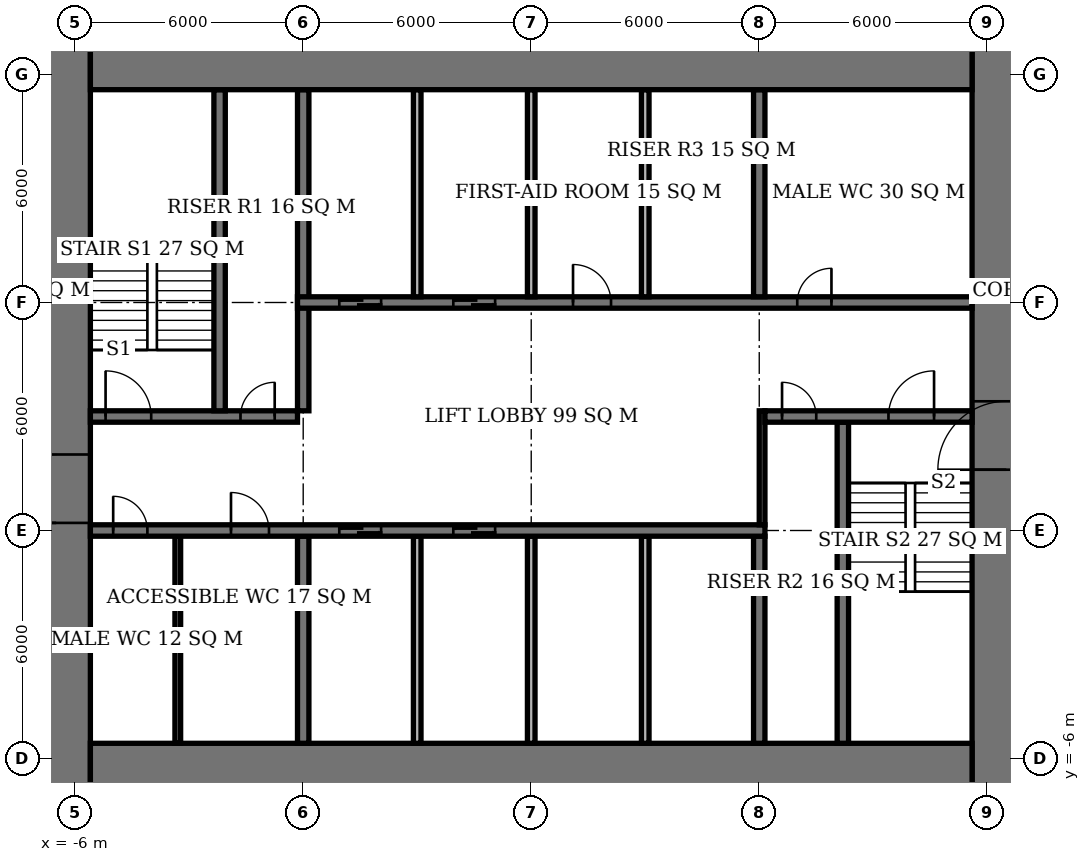
"""IFC4 building model, lengths in metres.
Left out: names, types, materials, properties, quantities, classifications, styles, units other than length and angle.
Written with IfcOpenShell. Run it as: python <this file> out.ifc"""

import sys

from ifc_helpers import new_model, si_unit, direction, frame, frame_2d, origin, place, context, subcontext, project, spatial, rectangle, extrude, element, fill, save


model = new_model("IFC4")
c1 = context("Model", 3, precision=1e-05, world=origin(), true_north=direction((0.0, 1.0)))
c2 = subcontext(c1, "Body", "Model", "MODEL_VIEW")
j1 = project(units=[si_unit("LENGTHUNIT", "METRE"), si_unit("PLANEANGLEUNIT", "RADIAN")], contexts=[c1])
p1 = place(None, origin())
s1 = spatial("IfcSite", under=j1, at=p1, CompositionType="ELEMENT")
p2 = place(p1, origin())
s2 = spatial("IfcBuilding", under=s1, at=p2, CompositionType="ELEMENT")
p3 = place(p2, frame((0.0, 0.0, 125.0)))
s3 = spatial("IfcBuildingStorey", under=s2, at=p3, CompositionType="ELEMENT", Elevation=125.0)
for number, where, z_axis, x_axis in (
    (1, (-5.6, -6.6, 0.0), (0.0, 0.0, 1.0), (1.0, 0.0, 0.0)),
    (2, (-5.6, 12.6, 0.0), (0.0, 0.0, 1.0), (1.0, 0.0, 0.0)),
):
    element("IfcWall", number, at=place(p3, frame(where, z_axis=z_axis, x_axis=x_axis)), inside=s3, PredefinedType="SHEAR", context=c2, shape_type="SweptSolid", body=[
        extrude(rectangle(XDim=23.2, YDim=2.0, at=frame_2d((11.6, 0.0))), origin(), (0.0, 0.0, 1.0), 3.9),
    ])
p4 = place(p3, frame((-6.5, -7.6, 0.0), z_axis=(0.0, 0.0, 1.0), x_axis=(0.0, 1.0, 0.0)))
e3 = element("IfcWall", 3, at=p4, inside=s3, PredefinedType="SHEAR", context=c2, shape_type="SweptSolid", body=[
    extrude(rectangle(XDim=21.2, YDim=1.8, at=frame_2d((10.6, 0.0))), origin(), (0.0, 0.0, 1.0), 3.9),
])
p5 = place(p4, frame((7.8, 0.0, 0.0)))
e4 = element("IfcOpeningElement", 4, at=p5, cuts=e3, PredefinedType="OPENING", context=c2, shape_type="SweptSolid", body=[
    extrude(rectangle(XDim=1.8, YDim=2.4, at=frame_2d((0.9, 1.2))), frame((0.0, 0.91, 0.0), z_axis=(0.0, -1.0, 0.0), x_axis=(1.0, 0.0, 0.0)), (0.0, 0.0, 1.0), 1.82),
])
p6 = place(p3, frame((18.5, -7.6, 0.0), z_axis=(0.0, 0.0, 1.0), x_axis=(0.0, 1.0, 0.0)))
e5 = element("IfcWall", 5, at=p6, inside=s3, PredefinedType="SHEAR", context=c2, shape_type="SweptSolid", body=[
    extrude(rectangle(XDim=21.2, YDim=1.8, at=frame_2d((10.6, 0.0))), origin(), (0.0, 0.0, 1.0), 3.9),
])
p7 = place(p6, frame((9.2, 0.0, 0.0)))
e6 = element("IfcOpeningElement", 6, at=p7, cuts=e5, PredefinedType="OPENING", context=c2, shape_type="SweptSolid", body=[
    extrude(rectangle(XDim=1.8, YDim=2.4, at=frame_2d((0.9, 1.2))), frame((0.0, 0.91, 0.0), z_axis=(0.0, -1.0, 0.0), x_axis=(1.0, 0.0, 0.0)), (0.0, 0.0, 1.0), 1.82),
])
p8 = place(p3, frame((-5.6, 0.0, 0.0), z_axis=(0.0, 0.0, 1.0), x_axis=(1.0, 0.0, 0.0)))
e7 = element("IfcWall", 7, at=p8, inside=s3, PredefinedType="SHEAR", context=c2, shape_type="SweptSolid", body=[
    extrude(rectangle(XDim=17.75, YDim=0.3, at=frame_2d((8.875, 0.0))), origin(), (0.0, 0.0, 1.0), 3.9),
])
p9 = place(p8, frame((0.6, 0.0, 0.0)))
e8 = element("IfcOpeningElement", 8, at=p9, cuts=e7, PredefinedType="OPENING", context=c2, shape_type="SweptSolid", body=[
    extrude(rectangle(XDim=0.9, YDim=2.1, at=frame_2d((0.45, 1.05))), frame((0.0, 0.16, 0.0), z_axis=(0.0, -1.0, 0.0), x_axis=(1.0, 0.0, 0.0)), (0.0, 0.0, 1.0), 0.32),
])
p10 = place(p8, frame((3.7, 0.0, 0.0)))
e9 = element("IfcOpeningElement", 9, at=p10, cuts=e7, PredefinedType="OPENING", context=c2, shape_type="SweptSolid", body=[
    extrude(rectangle(XDim=1.0, YDim=2.1, at=frame_2d((0.5, 1.05))), frame((0.0, 0.16, 0.0), z_axis=(0.0, -1.0, 0.0), x_axis=(1.0, 0.0, 0.0)), (0.0, 0.0, 1.0), 0.32),
])
p11 = place(p8, frame((6.55, 0.0, 0.0)))
e10 = element("IfcOpeningElement", 10, at=p11, cuts=e7, PredefinedType="OPENING", context=c2, shape_type="SweptSolid", body=[
    extrude(rectangle(XDim=1.1, YDim=2.1, at=frame_2d((0.55, 1.05))), frame((0.0, 0.16, 0.0), z_axis=(0.0, -1.0, 0.0), x_axis=(1.0, 0.0, 0.0)), (0.0, 0.0, 1.0), 0.32),
])
p12 = place(p8, frame((9.55, 0.0, 0.0)))
e11 = element("IfcOpeningElement", 11, at=p12, cuts=e7, PredefinedType="OPENING", context=c2, shape_type="SweptSolid", body=[
    extrude(rectangle(XDim=1.1, YDim=2.1, at=frame_2d((0.55, 1.05))), frame((0.0, 0.16, 0.0), z_axis=(0.0, -1.0, 0.0), x_axis=(1.0, 0.0, 0.0)), (0.0, 0.0, 1.0), 0.32),
])
p13 = place(p3, frame((-5.6, 3.0, 0.0), z_axis=(0.0, 0.0, 1.0), x_axis=(1.0, 0.0, 0.0)))
e12 = element("IfcWall", 12, at=p13, inside=s3, PredefinedType="SHEAR", context=c2, shape_type="SweptSolid", body=[
    extrude(rectangle(XDim=5.45, YDim=0.3, at=frame_2d((2.725, 0.0))), origin(), (0.0, 0.0, 1.0), 3.9),
])
p14 = place(p13, frame((0.4, 0.0, 0.0)))
e13 = element("IfcOpeningElement", 13, at=p14, cuts=e12, PredefinedType="OPENING", context=c2, shape_type="SweptSolid", body=[
    extrude(rectangle(XDim=1.2, YDim=2.1, at=frame_2d((0.6, 1.05))), frame((0.0, 0.16, 0.0), z_axis=(0.0, -1.0, 0.0), x_axis=(1.0, 0.0, 0.0)), (0.0, 0.0, 1.0), 0.32),
])
p15 = place(p13, frame((3.95, 0.0, 0.0)))
e14 = element("IfcOpeningElement", 14, at=p15, cuts=e12, PredefinedType="OPENING", context=c2, shape_type="SweptSolid", body=[
    extrude(rectangle(XDim=0.9, YDim=2.1, at=frame_2d((0.45, 1.05))), frame((0.0, 0.16, 0.0), z_axis=(0.0, -1.0, 0.0), x_axis=(1.0, 0.0, 0.0)), (0.0, 0.0, 1.0), 0.32),
])
p16 = place(p3, frame((12.15, 3.0, 0.0), z_axis=(0.0, 0.0, 1.0), x_axis=(1.0, 0.0, 0.0)))
e15 = element("IfcWall", 15, at=p16, inside=s3, PredefinedType="SHEAR", context=c2, shape_type="SweptSolid", body=[
    extrude(rectangle(XDim=5.45, YDim=0.3, at=frame_2d((2.725, 0.0))), origin(), (0.0, 0.0, 1.0), 3.9),
])
p17 = place(p16, frame((3.25, 0.0, 0.0)))
e16 = element("IfcOpeningElement", 16, at=p17, cuts=e15, PredefinedType="OPENING", context=c2, shape_type="SweptSolid", body=[
    extrude(rectangle(XDim=1.2, YDim=2.1, at=frame_2d((0.6, 1.05))), frame((0.0, 0.16, 0.0), z_axis=(0.0, -1.0, 0.0), x_axis=(1.0, 0.0, 0.0)), (0.0, 0.0, 1.0), 0.32),
])
p18 = place(p16, frame((0.45, 0.0, 0.0)))
e17 = element("IfcOpeningElement", 17, at=p18, cuts=e15, PredefinedType="OPENING", context=c2, shape_type="SweptSolid", body=[
    extrude(rectangle(XDim=0.9, YDim=2.1, at=frame_2d((0.45, 1.05))), frame((0.0, 0.16, 0.0), z_axis=(0.0, -1.0, 0.0), x_axis=(1.0, 0.0, 0.0)), (0.0, 0.0, 1.0), 0.32),
])
p19 = place(p3, frame((-0.15, 6.0, 0.0), z_axis=(0.0, 0.0, 1.0), x_axis=(1.0, 0.0, 0.0)))
e18 = element("IfcWall", 18, at=p19, inside=s3, PredefinedType="SHEAR", context=c2, shape_type="SweptSolid", body=[
    extrude(rectangle(XDim=17.75, YDim=0.3, at=frame_2d((8.875, 0.0))), origin(), (0.0, 0.0, 1.0), 3.9),
])
p20 = place(p19, frame((13.15, 0.0, 0.0)))
e19 = element("IfcOpeningElement", 19, at=p20, cuts=e18, PredefinedType="OPENING", context=c2, shape_type="SweptSolid", body=[
    extrude(rectangle(XDim=0.9, YDim=2.1, at=frame_2d((0.45, 1.05))), frame((0.0, 0.16, 0.0), z_axis=(0.0, -1.0, 0.0), x_axis=(1.0, 0.0, 0.0)), (0.0, 0.0, 1.0), 0.32),
])
p21 = place(p19, frame((7.25, 0.0, 0.0)))
e20 = element("IfcOpeningElement", 20, at=p21, cuts=e18, PredefinedType="OPENING", context=c2, shape_type="SweptSolid", body=[
    extrude(rectangle(XDim=1.0, YDim=2.1, at=frame_2d((0.5, 1.05))), frame((0.0, 0.16, 0.0), z_axis=(0.0, -1.0, 0.0), x_axis=(1.0, 0.0, 0.0)), (0.0, 0.0, 1.0), 0.32),
])
p22 = place(p19, frame((1.1, 0.0, 0.0)))
e21 = element("IfcOpeningElement", 21, at=p22, cuts=e18, PredefinedType="OPENING", context=c2, shape_type="SweptSolid", body=[
    extrude(rectangle(XDim=1.1, YDim=2.1, at=frame_2d((0.55, 1.05))), frame((0.0, 0.16, 0.0), z_axis=(0.0, -1.0, 0.0), x_axis=(1.0, 0.0, 0.0)), (0.0, 0.0, 1.0), 0.32),
])
p23 = place(p19, frame((4.1, 0.0, 0.0)))
e22 = element("IfcOpeningElement", 22, at=p23, cuts=e18, PredefinedType="OPENING", context=c2, shape_type="SweptSolid", body=[
    extrude(rectangle(XDim=1.1, YDim=2.1, at=frame_2d((0.55, 1.05))), frame((0.0, 0.16, 0.0), z_axis=(0.0, -1.0, 0.0), x_axis=(1.0, 0.0, 0.0)), (0.0, 0.0, 1.0), 0.32),
])
p24 = place(p3, frame((0.0, -5.6, 0.0), z_axis=(0.0, 0.0, 1.0), x_axis=(0.0, 1.0, 0.0)))
e23 = element("IfcWall", 23, at=p24, inside=s3, PredefinedType="SHEAR", context=c2, shape_type="SweptSolid", body=[
    extrude(rectangle(XDim=5.45, YDim=0.3, at=frame_2d((2.725, 0.0))), origin(), (0.0, 0.0, 1.0), 3.9),
])
p25 = place(p3, frame((0.0, 3.15, 0.0), z_axis=(0.0, 0.0, 1.0), x_axis=(0.0, 1.0, 0.0)))
e24 = element("IfcWall", 24, at=p25, inside=s3, PredefinedType="SHEAR", context=c2, shape_type="SweptSolid", body=[
    extrude(rectangle(XDim=8.45, YDim=0.3, at=frame_2d((4.225, 0.0))), origin(), (0.0, 0.0, 1.0), 3.9),
])
for number, where, z_axis, x_axis in (
    (25, (12.0, -5.6, 0.0), (0.0, 0.0, 1.0), (0.0, 1.0, 0.0)),
    (26, (12.0, 6.15, 0.0), (0.0, 0.0, 1.0), (0.0, 1.0, 0.0)),
):
    element("IfcWall", number, at=place(p3, frame(where, z_axis=z_axis, x_axis=x_axis)), inside=s3, PredefinedType="SHEAR", context=c2, shape_type="SweptSolid", body=[
        extrude(rectangle(XDim=5.45, YDim=0.3, at=frame_2d((2.725, 0.0))), origin(), (0.0, 0.0, 1.0), 3.9),
    ])
for number, where, z_axis, x_axis in (
    (27, (-2.2, 3.15, 0.0), (0.0, 0.0, 1.0), (0.0, 1.0, 0.0)),
    (28, (14.2, -5.6, 0.0), (0.0, 0.0, 1.0), (0.0, 1.0, 0.0)),
):
    element("IfcWall", number, at=place(p3, frame(where, z_axis=z_axis, x_axis=x_axis)), inside=s3, PredefinedType="SHEAR", context=c2, shape_type="SweptSolid", body=[
        extrude(rectangle(XDim=8.45, YDim=0.3, at=frame_2d((4.225, 0.0))), origin(), (0.0, 0.0, 1.0), 3.9),
    ])
for number, where, z_axis, x_axis in (
    (29, (3.0, 6.15, 0.0), (0.0, 0.0, 1.0), (0.0, 1.0, 0.0)),
    (30, (6.0, 6.15, 0.0), (0.0, 0.0, 1.0), (0.0, 1.0, 0.0)),
    (31, (9.0, 6.15, 0.0), (0.0, 0.0, 1.0), (0.0, 1.0, 0.0)),
    (32, (3.0, -5.6, 0.0), (0.0, 0.0, 1.0), (0.0, 1.0, 0.0)),
    (33, (6.0, -5.6, 0.0), (0.0, 0.0, 1.0), (0.0, 1.0, 0.0)),
    (34, (9.0, -5.6, 0.0), (0.0, 0.0, 1.0), (0.0, 1.0, 0.0)),
):
    element("IfcWall", number, at=place(p3, frame(where, z_axis=z_axis, x_axis=x_axis)), inside=s3, PredefinedType="SOLIDWALL", context=c2, shape_type="SweptSolid", body=[
        extrude(rectangle(XDim=5.45, YDim=0.2, at=frame_2d((2.725, 0.0))), origin(), (0.0, 0.0, 1.0), 3.9),
    ])
p26 = place(p3, frame((-3.3, -5.6, 0.0), z_axis=(0.0, 0.0, 1.0), x_axis=(0.0, 1.0, 0.0)))
e35 = element("IfcWall", 35, at=p26, inside=s3, PredefinedType="PLUMBINGWALL", context=c2, shape_type="SweptSolid", body=[
    extrude(rectangle(XDim=5.45, YDim=0.15, at=frame_2d((2.725, 0.0))), origin(), (0.0, 0.0, 1.0), 3.65),
])
p27 = place(p3, frame((12.075, 0.15, 0.0), z_axis=(0.0, 0.0, 1.0), x_axis=(0.0, 1.0, 0.0)))
e36 = element("IfcWall", 36, at=p27, inside=s3, PredefinedType="PARTITIONING", context=c2, shape_type="SweptSolid", body=[
    extrude(rectangle(XDim=3.0, YDim=0.15, at=frame_2d((1.5, 0.0))), origin(), (0.0, 0.0, 1.0), 3.65),
])
p28 = place(p5, origin())
e37 = element("IfcDoor", 37, at=p28, inside=s3, OperationType="DOUBLE_DOOR_SINGLE_SWING", PredefinedType="DOOR", context=c2, shape_type="SweptSolid", body=[
    extrude(rectangle(XDim=1.8, YDim=2.4, at=frame_2d((0.9, 1.2))), frame((0.0, 0.025, 0.0), z_axis=(0.0, -1.0, 0.0), x_axis=(1.0, 0.0, 0.0)), (0.0, 0.0, 1.0), 0.05),
])
fill(e4, e37)
p29 = place(p7, origin())
e38 = element("IfcDoor", 38, at=p29, inside=s3, OperationType="DOUBLE_DOOR_SINGLE_SWING", PredefinedType="DOOR", context=c2, shape_type="SweptSolid", body=[
    extrude(rectangle(XDim=1.8, YDim=2.4, at=frame_2d((0.9, 1.2))), frame((0.0, 0.025, 0.0), z_axis=(0.0, -1.0, 0.0), x_axis=(1.0, 0.0, 0.0)), (0.0, 0.0, 1.0), 0.05),
])
fill(e6, e38)
p30 = place(p14, origin())
e39 = element("IfcDoor", 39, at=p30, inside=s3, OperationType="SINGLE_SWING_LEFT", PredefinedType="DOOR", context=c2, shape_type="SweptSolid", body=[
    extrude(rectangle(XDim=1.2, YDim=2.1, at=frame_2d((0.6, 1.05))), frame((0.0, 0.025, 0.0), z_axis=(0.0, -1.0, 0.0), x_axis=(1.0, 0.0, 0.0)), (0.0, 0.0, 1.0), 0.05),
])
fill(e13, e39)
p31 = place(p15, origin())
e40 = element("IfcDoor", 40, at=p31, inside=s3, OperationType="SINGLE_SWING_RIGHT", PredefinedType="DOOR", context=c2, shape_type="SweptSolid", body=[
    extrude(rectangle(XDim=0.9, YDim=2.1, at=frame_2d((0.45, 1.05))), frame((0.0, 0.025, 0.0), z_axis=(0.0, -1.0, 0.0), x_axis=(1.0, 0.0, 0.0)), (0.0, 0.0, 1.0), 0.05),
])
fill(e14, e40)
p32 = place(p17, origin())
e41 = element("IfcDoor", 41, at=p32, inside=s3, OperationType="SINGLE_SWING_RIGHT", PredefinedType="DOOR", context=c2, shape_type="SweptSolid", body=[
    extrude(rectangle(XDim=1.2, YDim=2.1, at=frame_2d((0.6, 1.05))), frame((0.0, 0.025, 0.0), z_axis=(0.0, -1.0, 0.0), x_axis=(1.0, 0.0, 0.0)), (0.0, 0.0, 1.0), 0.05),
])
fill(e16, e41)
p33 = place(p18, origin())
e42 = element("IfcDoor", 42, at=p33, inside=s3, OperationType="SINGLE_SWING_LEFT", PredefinedType="DOOR", context=c2, shape_type="SweptSolid", body=[
    extrude(rectangle(XDim=0.9, YDim=2.1, at=frame_2d((0.45, 1.05))), frame((0.0, 0.025, 0.0), z_axis=(0.0, -1.0, 0.0), x_axis=(1.0, 0.0, 0.0)), (0.0, 0.0, 1.0), 0.05),
])
fill(e17, e42)
p34 = place(p9, origin())
e43 = element("IfcDoor", 43, at=p34, inside=s3, OperationType="SINGLE_SWING_LEFT", PredefinedType="DOOR", context=c2, shape_type="SweptSolid", body=[
    extrude(rectangle(XDim=0.9, YDim=2.1, at=frame_2d((0.45, 1.05))), frame((0.0, 0.025, 0.0), z_axis=(0.0, -1.0, 0.0), x_axis=(1.0, 0.0, 0.0)), (0.0, 0.0, 1.0), 0.05),
])
fill(e8, e43)
p35 = place(p10, origin())
e44 = element("IfcDoor", 44, at=p35, inside=s3, OperationType="SINGLE_SWING_LEFT", PredefinedType="DOOR", context=c2, shape_type="SweptSolid", body=[
    extrude(rectangle(XDim=1.0, YDim=2.1, at=frame_2d((0.5, 1.05))), frame((0.0, 0.025, 0.0), z_axis=(0.0, -1.0, 0.0), x_axis=(1.0, 0.0, 0.0)), (0.0, 0.0, 1.0), 0.05),
])
fill(e9, e44)
p36 = place(p20, origin())
e45 = element("IfcDoor", 45, at=p36, inside=s3, OperationType="SINGLE_SWING_RIGHT", PredefinedType="DOOR", context=c2, shape_type="SweptSolid", body=[
    extrude(rectangle(XDim=0.9, YDim=2.1, at=frame_2d((0.45, 1.05))), frame((0.0, 0.025, 0.0), z_axis=(0.0, -1.0, 0.0), x_axis=(1.0, 0.0, 0.0)), (0.0, 0.0, 1.0), 0.05),
])
fill(e19, e45)
p37 = place(p21, origin())
e46 = element("IfcDoor", 46, at=p37, inside=s3, OperationType="SINGLE_SWING_LEFT", PredefinedType="DOOR", context=c2, shape_type="SweptSolid", body=[
    extrude(rectangle(XDim=1.0, YDim=2.1, at=frame_2d((0.5, 1.05))), frame((0.0, 0.025, 0.0), z_axis=(0.0, -1.0, 0.0), x_axis=(1.0, 0.0, 0.0)), (0.0, 0.0, 1.0), 0.05),
])
fill(e20, e46)
p38 = place(p22, origin())
e47 = element("IfcDoor", 47, at=p38, inside=s3, OperationType="DOUBLE_DOOR_SLIDING", PredefinedType="USERDEFINED", context=c2, shape_type="SweptSolid", body=[
    extrude(rectangle(XDim=1.1, YDim=2.1, at=frame_2d((0.55, 1.05))), frame((0.0, 0.025, 0.0), z_axis=(0.0, -1.0, 0.0), x_axis=(1.0, 0.0, 0.0)), (0.0, 0.0, 1.0), 0.05),
])
fill(e21, e47)
p39 = place(p23, origin())
e48 = element("IfcDoor", 48, at=p39, inside=s3, OperationType="DOUBLE_DOOR_SLIDING", PredefinedType="USERDEFINED", context=c2, shape_type="SweptSolid", body=[
    extrude(rectangle(XDim=1.1, YDim=2.1, at=frame_2d((0.55, 1.05))), frame((0.0, 0.025, 0.0), z_axis=(0.0, -1.0, 0.0), x_axis=(1.0, 0.0, 0.0)), (0.0, 0.0, 1.0), 0.05),
])
fill(e22, e48)
p40 = place(p11, origin())
e49 = element("IfcDoor", 49, at=p40, inside=s3, OperationType="DOUBLE_DOOR_SLIDING", PredefinedType="USERDEFINED", context=c2, shape_type="SweptSolid", body=[
    extrude(rectangle(XDim=1.1, YDim=2.1, at=frame_2d((0.55, 1.05))), frame((0.0, 0.025, 0.0), z_axis=(0.0, -1.0, 0.0), x_axis=(1.0, 0.0, 0.0)), (0.0, 0.0, 1.0), 0.05),
])
fill(e10, e49)
p41 = place(p12, origin())
e50 = element("IfcDoor", 50, at=p41, inside=s3, OperationType="DOUBLE_DOOR_SLIDING", PredefinedType="USERDEFINED", context=c2, shape_type="SweptSolid", body=[
    extrude(rectangle(XDim=1.1, YDim=2.1, at=frame_2d((0.55, 1.05))), frame((0.0, 0.025, 0.0), z_axis=(0.0, -1.0, 0.0), x_axis=(1.0, 0.0, 0.0)), (0.0, 0.0, 1.0), 0.05),
])
fill(e11, e50)
save(model, sys.argv[1])
